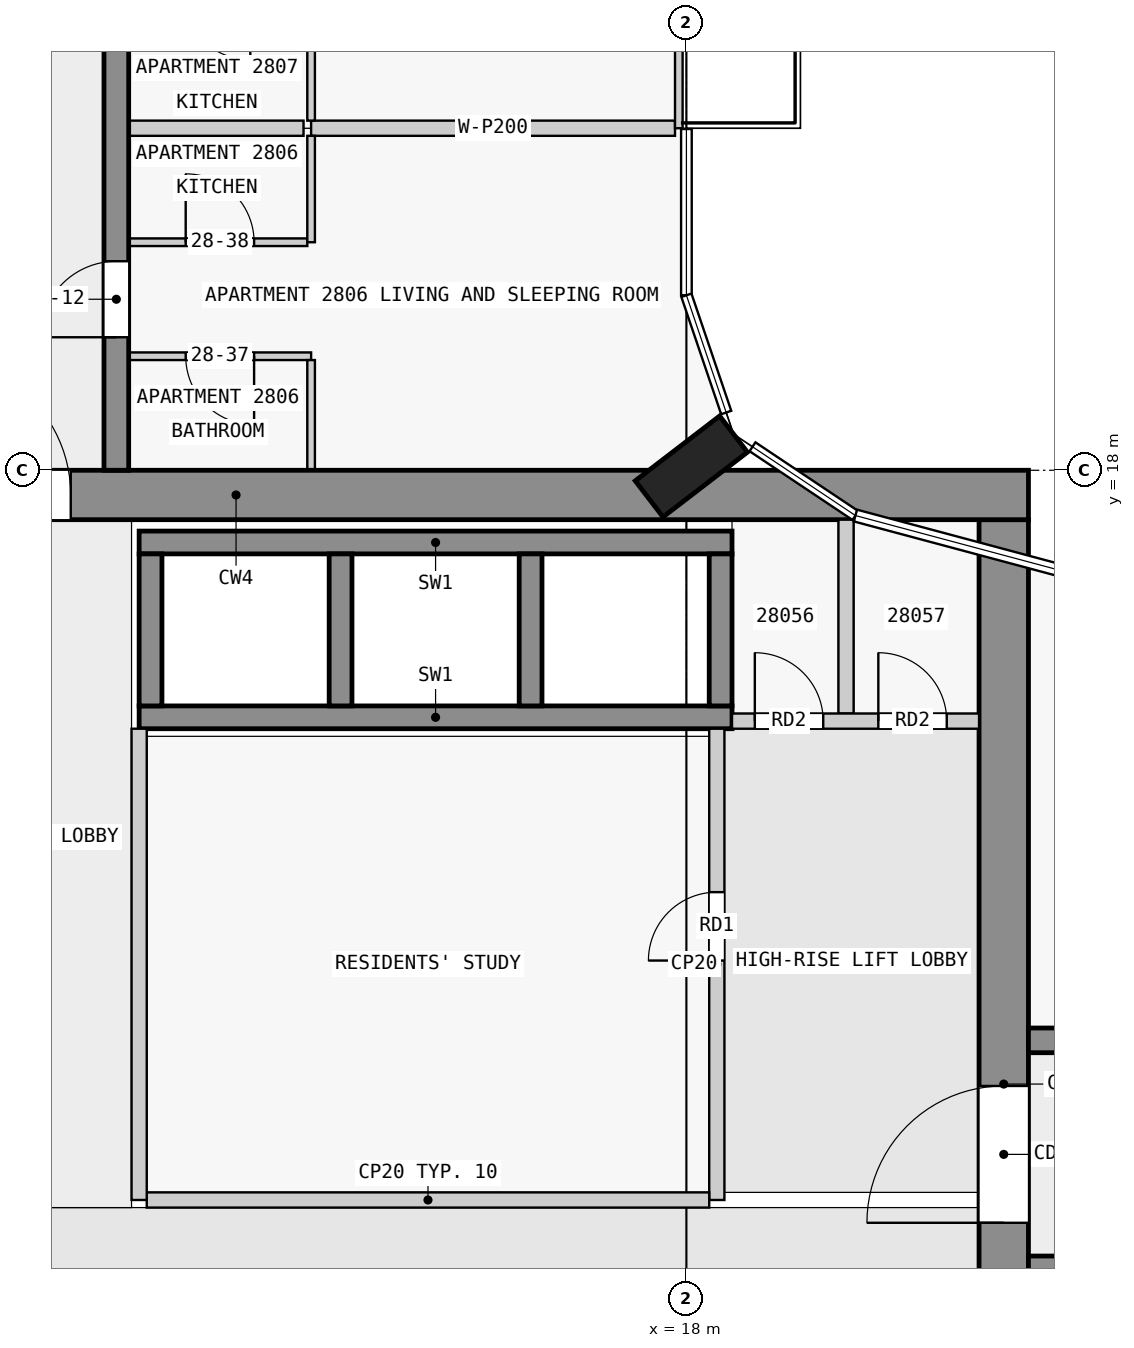
"""IFC4 building model, lengths in metres.
Left out: names, types, materials, properties, quantities, classifications, styles, units other than length and angle.
Written with IfcOpenShell. Run it as: python <this file> out.ifc"""

import sys

from ifc_helpers import new_model, si_unit, direction, frame, frame_2d, origin, origin_2d, place, context, subcontext, project, spatial, rectangle, extrude, element, fill, save


model = new_model("IFC4")
c1 = context("Model", 3, precision=1e-05, world=origin(), true_north=direction((0.0, 1.0)))
c2 = subcontext(c1, "Body", "Model", "MODEL_VIEW")
j1 = project(units=[si_unit("LENGTHUNIT", "METRE"), si_unit("PLANEANGLEUNIT", "RADIAN")], contexts=[c1])
p1 = place(None, origin())
s1 = spatial("IfcSite", under=j1, at=p1, CompositionType="ELEMENT")
p2 = place(p1, origin())
s2 = spatial("IfcBuilding", under=s1, at=p2, CompositionType="ELEMENT")
p3 = place(p2, frame((0.0, 0.0, 109.8)))
s3 = spatial("IfcBuildingStorey", under=s2, at=p3, CompositionType="ELEMENT", Elevation=109.8)
p4 = place(p3, frame((18.065, 18.05, 0.0), z_axis=(0.0, 0.0, 1.0), x_axis=(-0.608810846443, 0.793315418515, 0.0)))
e1 = element("IfcColumn", 1, at=p4, inside=s3, PredefinedType="COLUMN", context=c2, shape_type="SweptSolid", body=[
    extrude(rectangle(XDim=0.6, YDim=1.4, at=origin_2d()), origin(), (0.0, 0.0, 1.0), 3.5),
])
p5 = place(p3, frame((1.65, 17.675, 0.0), z_axis=(0.0, 0.0, 1.0), x_axis=(1.0, 0.0, 0.0)))
e2 = element("IfcWall", 2, at=p5, inside=s3, PredefinedType="SHEAR", context=c2, shape_type="SweptSolid", body=[
    extrude(rectangle(XDim=20.85, YDim=0.65, at=frame_2d((10.425, 0.0))), origin(), (0.0, 0.0, 1.0), 3.25),
])
p6 = place(p5, frame((6.45, 0.0, 0.0)))
e3 = element("IfcOpeningElement", 3, at=p6, cuts=e2, PredefinedType="OPENING", context=c2, shape_type="SweptSolid", body=[
    extrude(rectangle(XDim=1.8, YDim=2.1, at=frame_2d((0.9, 1.05))), frame((0.0, 0.335, 0.0), z_axis=(0.0, -1.0, 0.0), x_axis=(1.0, 0.0, 0.0)), (0.0, 0.0, 1.0), 0.67),
])
p7 = place(p3, frame((22.175, 2.5, 0.0), z_axis=(0.0, 0.0, 1.0), x_axis=(0.0, 1.0, 0.0)))
e4 = element("IfcWall", 4, at=p7, inside=s3, PredefinedType="SHEAR", context=c2, shape_type="SweptSolid", body=[
    extrude(rectangle(XDim=14.85, YDim=0.65, at=frame_2d((7.425, 0.0))), origin(), (0.0, 0.0, 1.0), 3.25),
])
p8 = place(p7, frame((5.6, 0.0, 0.0)))
e5 = element("IfcOpeningElement", 5, at=p8, cuts=e4, PredefinedType="OPENING", context=c2, shape_type="SweptSolid", body=[
    extrude(rectangle(XDim=1.8, YDim=2.1, at=frame_2d((0.9, 1.05))), frame((0.0, 0.335, 0.0), z_axis=(0.0, -1.0, 0.0), x_axis=(1.0, 0.0, 0.0)), (0.0, 0.0, 1.0), 0.67),
])
for number, where, z_axis, x_axis in (
    (6, (10.8, 17.05, 0.0), (0.0, 0.0, 1.0), (1.0, 0.0, 0.0)),
    (7, (10.8, 14.75, 0.0), (0.0, 0.0, 1.0), (1.0, 0.0, 0.0)),
):
    element("IfcWall", number, at=place(p3, frame(where, z_axis=z_axis, x_axis=x_axis)), inside=s3, PredefinedType="SHEAR", context=c2, shape_type="SweptSolid", body=[
        extrude(rectangle(XDim=7.8, YDim=0.3, at=frame_2d((3.9, 0.0))), origin(), (0.0, 0.0, 1.0), 3.25),
    ])
for number, where, z_axis, x_axis in (
    (8, (10.95, 14.9, 0.0), (0.0, 0.0, 1.0), (0.0, 1.0, 0.0)),
    (9, (13.45, 14.9, 0.0), (0.0, 0.0, 1.0), (0.0, 1.0, 0.0)),
    (10, (15.95, 14.9, 0.0), (0.0, 0.0, 1.0), (0.0, 1.0, 0.0)),
    (11, (18.45, 14.9, 0.0), (0.0, 0.0, 1.0), (0.0, 1.0, 0.0)),
):
    element("IfcWall", number, at=place(p3, frame(where, z_axis=z_axis, x_axis=x_axis)), inside=s3, PredefinedType="SHEAR", context=c2, shape_type="SweptSolid", body=[
        extrude(rectangle(XDim=2.0, YDim=0.3, at=frame_2d((1.0, 0.0))), origin(), (0.0, 0.0, 1.0), 3.25),
    ])
p9 = place(p3, frame((22.5, 7.5, 0.0), z_axis=(0.0, 0.0, 1.0), x_axis=(1.0, 0.0, 0.0)))
e12 = element("IfcWall", 12, at=p9, inside=s3, PredefinedType="SHEAR", context=c2, shape_type="SweptSolid", body=[
    extrude(rectangle(XDim=22.5, YDim=0.325, at=frame_2d((11.25, 0.0))), origin(), (0.0, 0.0, 1.0), 3.25),
])
p10 = place(p9, frame((4.05, 0.0, 0.0)))
e13 = element("IfcOpeningElement", 13, at=p10, cuts=e12, PredefinedType="OPENING", context=c2, shape_type="SweptSolid", body=[
    extrude(rectangle(XDim=1.0, YDim=2.1, at=frame_2d((0.5, 1.05))), frame((0.0, 0.172, 0.0), z_axis=(0.0, -1.0, 0.0), x_axis=(1.0, 0.0, 0.0)), (0.0, 0.0, 1.0), 0.345),
])
p11 = place(p9, frame((10.75, 0.0, 0.0)))
e14 = element("IfcOpeningElement", 14, at=p11, cuts=e12, PredefinedType="OPENING", context=c2, shape_type="SweptSolid", body=[
    extrude(rectangle(XDim=1.0, YDim=2.1, at=frame_2d((0.5, 1.05))), frame((0.0, 0.172, 0.0), z_axis=(0.0, -1.0, 0.0), x_axis=(1.0, 0.0, 0.0)), (0.0, 0.0, 1.0), 0.345),
])
p12 = place(p9, frame((16.85, 0.0, 0.0)))
e15 = element("IfcOpeningElement", 15, at=p12, cuts=e12, PredefinedType="OPENING", context=c2, shape_type="SweptSolid", body=[
    extrude(rectangle(XDim=1.0, YDim=2.1, at=frame_2d((0.5, 1.05))), frame((0.0, 0.172, 0.0), z_axis=(0.0, -1.0, 0.0), x_axis=(1.0, 0.0, 0.0)), (0.0, 0.0, 1.0), 0.345),
])
p13 = place(p3, frame((22.5, 10.5, 0.0), z_axis=(0.0, 0.0, 1.0), x_axis=(1.0, 0.0, 0.0)))
e16 = element("IfcWall", 16, at=p13, inside=s3, PredefinedType="SHEAR", context=c2, shape_type="SweptSolid", body=[
    extrude(rectangle(XDim=22.5, YDim=0.325, at=frame_2d((11.25, 0.0))), origin(), (0.0, 0.0, 1.0), 3.25),
])
p14 = place(p13, frame((1.85, 0.0, 0.0)))
e17 = element("IfcOpeningElement", 17, at=p14, cuts=e16, PredefinedType="OPENING", context=c2, shape_type="SweptSolid", body=[
    extrude(rectangle(XDim=0.9, YDim=2.1, at=frame_2d((0.45, 1.05))), frame((0.0, 0.172, 0.0), z_axis=(0.0, -1.0, 0.0), x_axis=(1.0, 0.0, 0.0)), (0.0, 0.0, 1.0), 0.345),
])
p15 = place(p13, frame((6.25, 0.0, 0.0)))
e18 = element("IfcOpeningElement", 18, at=p15, cuts=e16, PredefinedType="OPENING", context=c2, shape_type="SweptSolid", body=[
    extrude(rectangle(XDim=1.0, YDim=2.1, at=frame_2d((0.5, 1.05))), frame((0.0, 0.172, 0.0), z_axis=(0.0, -1.0, 0.0), x_axis=(1.0, 0.0, 0.0)), (0.0, 0.0, 1.0), 0.345),
])
p16 = place(p13, frame((13.05, 0.0, 0.0)))
e19 = element("IfcOpeningElement", 19, at=p16, cuts=e16, PredefinedType="OPENING", context=c2, shape_type="SweptSolid", body=[
    extrude(rectangle(XDim=1.0, YDim=2.1, at=frame_2d((0.5, 1.05))), frame((0.0, 0.172, 0.0), z_axis=(0.0, -1.0, 0.0), x_axis=(1.0, 0.0, 0.0)), (0.0, 0.0, 1.0), 0.345),
])
p17 = place(p13, frame((18.75, 0.0, 0.0)))
e20 = element("IfcOpeningElement", 20, at=p17, cuts=e16, PredefinedType="OPENING", context=c2, shape_type="SweptSolid", body=[
    extrude(rectangle(XDim=0.9, YDim=2.1, at=frame_2d((0.45, 1.05))), frame((0.0, 0.172, 0.0), z_axis=(0.0, -1.0, 0.0), x_axis=(1.0, 0.0, 0.0)), (0.0, 0.0, 1.0), 0.345),
])
p18 = place(p13, frame((20.95, 0.0, 0.0)))
e21 = element("IfcOpeningElement", 21, at=p18, cuts=e16, PredefinedType="OPENING", context=c2, shape_type="SweptSolid", body=[
    extrude(rectangle(XDim=1.0, YDim=2.1, at=frame_2d((0.5, 1.05))), frame((0.0, 0.172, 0.0), z_axis=(0.0, -1.0, 0.0), x_axis=(1.0, 0.0, 0.0)), (0.0, 0.0, 1.0), 0.345),
])
p19 = place(p3, frame((10.5, 18.0, 0.0), z_axis=(0.0, 0.0, 1.0), x_axis=(0.0, 1.0, 0.0)))
e22 = element("IfcWall", 22, at=p19, inside=s3, PredefinedType="SHEAR", context=c2, shape_type="SweptSolid", body=[
    extrude(rectangle(XDim=27.0, YDim=0.325, at=frame_2d((13.5, 0.0))), origin(), (0.0, 0.0, 1.0), 3.25),
])
p20 = place(p19, frame((1.75, 0.0, 0.0)))
e23 = element("IfcOpeningElement", 23, at=p20, cuts=e22, PredefinedType="OPENING", context=c2, shape_type="SweptSolid", body=[
    extrude(rectangle(XDim=1.0, YDim=2.1, at=frame_2d((0.5, 1.05))), frame((0.0, 0.172, 0.0), z_axis=(0.0, -1.0, 0.0), x_axis=(1.0, 0.0, 0.0)), (0.0, 0.0, 1.0), 0.345),
])
p21 = place(p19, frame((8.55, 0.0, 0.0)))
e24 = element("IfcOpeningElement", 24, at=p21, cuts=e22, PredefinedType="OPENING", context=c2, shape_type="SweptSolid", body=[
    extrude(rectangle(XDim=1.0, YDim=2.1, at=frame_2d((0.5, 1.05))), frame((0.0, 0.172, 0.0), z_axis=(0.0, -1.0, 0.0), x_axis=(1.0, 0.0, 0.0)), (0.0, 0.0, 1.0), 0.345),
])
p22 = place(p19, frame((15.35, 0.0, 0.0)))
e25 = element("IfcOpeningElement", 25, at=p22, cuts=e22, PredefinedType="OPENING", context=c2, shape_type="SweptSolid", body=[
    extrude(rectangle(XDim=0.9, YDim=2.1, at=frame_2d((0.45, 1.05))), frame((0.0, 0.172, 0.0), z_axis=(0.0, -1.0, 0.0), x_axis=(1.0, 0.0, 0.0)), (0.0, 0.0, 1.0), 0.345),
])
p23 = place(p19, frame((19.75, 0.0, 0.0)))
e26 = element("IfcOpeningElement", 26, at=p23, cuts=e22, PredefinedType="OPENING", context=c2, shape_type="SweptSolid", body=[
    extrude(rectangle(XDim=1.0, YDim=2.1, at=frame_2d((0.5, 1.05))), frame((0.0, 0.172, 0.0), z_axis=(0.0, -1.0, 0.0), x_axis=(1.0, 0.0, 0.0)), (0.0, 0.0, 1.0), 0.345),
])
p24 = place(p19, frame((23.25, 0.0, 0.0)))
e27 = element("IfcOpeningElement", 27, at=p24, cuts=e22, PredefinedType="OPENING", context=c2, shape_type="SweptSolid", body=[
    extrude(rectangle(XDim=0.9, YDim=2.1, at=frame_2d((0.45, 1.05))), frame((0.0, 0.172, 0.0), z_axis=(0.0, -1.0, 0.0), x_axis=(1.0, 0.0, 0.0)), (0.0, 0.0, 1.0), 0.345),
])
p25 = place(p19, frame((25.45, 0.0, 0.0)))
e28 = element("IfcOpeningElement", 28, at=p25, cuts=e22, PredefinedType="OPENING", context=c2, shape_type="SweptSolid", body=[
    extrude(rectangle(XDim=1.0, YDim=2.1, at=frame_2d((0.5, 1.05))), frame((0.0, 0.172, 0.0), z_axis=(0.0, -1.0, 0.0), x_axis=(1.0, 0.0, 0.0)), (0.0, 0.0, 1.0), 0.345),
])
p26 = place(p3, frame((17.9, 27.0, 0.0), z_axis=(0.0, 0.0, 1.0), x_axis=(0.0, -1.0, 0.0)))
e29 = element("IfcWall", 29, at=p26, inside=s3, PredefinedType="STANDARD", context=c2, shape_type="SweptSolid", body=[
    extrude(rectangle(XDim=4.5, YDim=0.1, at=frame_2d((2.25, 0.0))), origin(), (0.0, 0.0, 1.0), 3.25),
])
p27 = place(p26, frame((1.05, 0.0, 0.0)))
e30 = element("IfcOpeningElement", 30, at=p27, cuts=e29, PredefinedType="OPENING", context=c2, shape_type="SweptSolid", body=[
    extrude(rectangle(XDim=2.4, YDim=2.4, at=frame_2d((1.2, 1.2))), frame((0.0, 0.06, 0.0), z_axis=(0.0, -1.0, 0.0), x_axis=(1.0, 0.0, 0.0)), (0.0, 0.0, 1.0), 0.12),
])
p28 = place(p3, frame((10.8, 8.4, 0.0), z_axis=(0.0, 0.0, 1.0), x_axis=(0.0, 1.0, 0.0)))
e31 = element("IfcWall", 31, at=p28, inside=s3, PredefinedType="PARTITIONING", context=c2, shape_type="SweptSolid", body=[
    extrude(rectangle(XDim=6.2, YDim=0.2, at=frame_2d((3.1, 0.0))), origin(), (0.0, 0.0, 1.0), 3.25),
])
p29 = place(p3, frame((10.9, 8.4, 0.0), z_axis=(0.0, 0.0, 1.0), x_axis=(1.0, 0.0, 0.0)))
e32 = element("IfcWall", 32, at=p29, inside=s3, PredefinedType="PARTITIONING", context=c2, shape_type="SweptSolid", body=[
    extrude(rectangle(XDim=7.4, YDim=0.2, at=frame_2d((3.7, 0.0))), origin(), (0.0, 0.0, 1.0), 3.25),
])
p30 = place(p3, frame((18.4, 8.4, 0.0), z_axis=(0.0, 0.0, 1.0), x_axis=(0.0, 1.0, 0.0)))
e33 = element("IfcWall", 33, at=p30, inside=s3, PredefinedType="PARTITIONING", context=c2, shape_type="SweptSolid", body=[
    extrude(rectangle(XDim=6.2, YDim=0.2, at=frame_2d((3.1, 0.0))), origin(), (0.0, 0.0, 1.0), 3.25),
])
p31 = place(p30, frame((3.15, 0.0, 0.0)))
e34 = element("IfcOpeningElement", 34, at=p31, cuts=e33, PredefinedType="OPENING", context=c2, shape_type="SweptSolid", body=[
    extrude(rectangle(XDim=0.9, YDim=2.1, at=frame_2d((0.45, 1.05))), frame((0.0, 0.11, 0.0), z_axis=(0.0, -1.0, 0.0), x_axis=(1.0, 0.0, 0.0)), (0.0, 0.0, 1.0), 0.22),
])
p32 = place(p3, frame((18.6, 14.7, 0.0), z_axis=(0.0, 0.0, 1.0), x_axis=(1.0, 0.0, 0.0)))
e35 = element("IfcWall", 35, at=p32, inside=s3, PredefinedType="PARTITIONING", context=c2, shape_type="SweptSolid", body=[
    extrude(rectangle(XDim=3.25, YDim=0.2, at=frame_2d((1.625, 0.0))), origin(), (0.0, 0.0, 1.0), 3.25),
])
p33 = place(p32, frame((0.3, 0.0, 0.0)))
e36 = element("IfcOpeningElement", 36, at=p33, cuts=e35, PredefinedType="OPENING", context=c2, shape_type="SweptSolid", body=[
    extrude(rectangle(XDim=0.9, YDim=2.1, at=frame_2d((0.45, 1.05))), frame((0.0, 0.11, 0.0), z_axis=(0.0, -1.0, 0.0), x_axis=(1.0, 0.0, 0.0)), (0.0, 0.0, 1.0), 0.22),
])
p34 = place(p32, frame((1.925, 0.0, 0.0)))
e37 = element("IfcOpeningElement", 37, at=p34, cuts=e35, PredefinedType="OPENING", context=c2, shape_type="SweptSolid", body=[
    extrude(rectangle(XDim=0.9, YDim=2.1, at=frame_2d((0.45, 1.05))), frame((0.0, 0.11, 0.0), z_axis=(0.0, -1.0, 0.0), x_axis=(1.0, 0.0, 0.0)), (0.0, 0.0, 1.0), 0.22),
])
p35 = place(p3, frame((20.1, 14.8, 0.0), z_axis=(0.0, 0.0, 1.0), x_axis=(0.0, 1.0, 0.0)))
e38 = element("IfcWall", 38, at=p35, inside=s3, PredefinedType="PARTITIONING", context=c2, shape_type="SweptSolid", body=[
    extrude(rectangle(XDim=2.55, YDim=0.2, at=frame_2d((1.275, 0.0))), origin(), (0.0, 0.0, 1.0), 3.25),
])
p36 = place(p3, frame((13.062, 19.5, 0.0), z_axis=(0.0, 0.0, 1.0), x_axis=(-1.0, 0.0, 0.0)))
e39 = element("IfcWall", 39, at=p36, inside=s3, PredefinedType="PARTITIONING", context=c2, shape_type="SweptSolid", body=[
    extrude(rectangle(XDim=2.4, YDim=0.1, at=frame_2d((1.2, 0.0))), origin(), (0.0, 0.0, 1.0), 3.25),
])
p37 = place(p36, frame((0.75, 0.0, 0.0)))
e40 = element("IfcOpeningElement", 40, at=p37, cuts=e39, PredefinedType="OPENING", context=c2, shape_type="SweptSolid", body=[
    extrude(rectangle(XDim=0.9, YDim=2.1, at=frame_2d((0.45, 1.05))), frame((0.0, 0.06, 0.0), z_axis=(0.0, -1.0, 0.0), x_axis=(1.0, 0.0, 0.0)), (0.0, 0.0, 1.0), 0.12),
])
p38 = place(p3, frame((10.663, 21.0, 0.0), z_axis=(0.0, 0.0, 1.0), x_axis=(1.0, 0.0, 0.0)))
e41 = element("IfcWall", 41, at=p38, inside=s3, PredefinedType="PARTITIONING", context=c2, shape_type="SweptSolid", body=[
    extrude(rectangle(XDim=2.35, YDim=0.1, at=frame_2d((1.175, 0.0))), origin(), (0.0, 0.0, 1.0), 3.25),
])
p39 = place(p38, frame((0.75, 0.0, 0.0)))
e42 = element("IfcOpeningElement", 42, at=p39, cuts=e41, PredefinedType="OPENING", context=c2, shape_type="SweptSolid", body=[
    extrude(rectangle(XDim=0.9, YDim=2.1, at=frame_2d((0.45, 1.05))), frame((0.0, 0.06, 0.0), z_axis=(0.0, -1.0, 0.0), x_axis=(1.0, 0.0, 0.0)), (0.0, 0.0, 1.0), 0.12),
])
p40 = place(p3, frame((12.962, 22.5, 0.0), z_axis=(0.0, 0.0, 1.0), x_axis=(-1.0, 0.0, 0.0)))
e43 = element("IfcWall", 43, at=p40, inside=s3, PredefinedType="PARTITIONING", context=c2, shape_type="SweptSolid", body=[
    extrude(rectangle(XDim=2.3, YDim=0.2, at=frame_2d((1.15, 0.0))), origin(), (0.0, 0.0, 1.0), 3.25),
])
p41 = place(p3, frame((13.062, 22.5, 0.0), z_axis=(0.0, 0.0, 1.0), x_axis=(1.0, 0.0, 0.0)))
e44 = element("IfcWall", 44, at=p41, inside=s3, PredefinedType="PARTITIONING", context=c2, shape_type="SweptSolid", body=[
    extrude(rectangle(XDim=4.788, YDim=0.2, at=frame_2d((2.394, 0.0))), origin(), (0.0, 0.0, 1.0), 3.25),
])
p42 = place(p3, frame((13.062, 18.0, 0.0), z_axis=(0.0, 0.0, 1.0), x_axis=(0.0, 1.0, 0.0)))
e45 = element("IfcWall", 45, at=p42, inside=s3, PredefinedType="PARTITIONING", context=c2, shape_type="SweptSolid", body=[
    extrude(rectangle(XDim=1.45, YDim=0.1, at=frame_2d((0.725, 0.0))), origin(), (0.0, 0.0, 1.0), 3.25),
])
p43 = place(p3, frame((13.062, 21.0, 0.0), z_axis=(0.0, 0.0, 1.0), x_axis=(0.0, 1.0, 0.0)))
e46 = element("IfcWall", 46, at=p43, inside=s3, PredefinedType="PARTITIONING", context=c2, shape_type="SweptSolid", body=[
    extrude(rectangle(XDim=1.4, YDim=0.1, at=frame_2d((0.7, 0.0))), origin(), (0.0, 0.0, 1.0), 3.25),
])
p44 = place(p3, frame((13.062, 22.6, 0.0), z_axis=(0.0, 0.0, 1.0), x_axis=(0.0, 1.0, 0.0)))
e47 = element("IfcWall", 47, at=p44, inside=s3, PredefinedType="PARTITIONING", context=c2, shape_type="SweptSolid", body=[
    extrude(rectangle(XDim=1.7, YDim=0.1, at=frame_2d((0.85, 0.0))), origin(), (0.0, 0.0, 1.0), 3.25),
])
p45 = place(p31, origin())
e48 = element("IfcDoor", 48, at=p45, inside=s3, OperationType="SINGLE_SWING_LEFT", PredefinedType="DOOR", context=c2, shape_type="SweptSolid", body=[
    extrude(rectangle(XDim=0.9, YDim=2.1, at=frame_2d((0.45, 1.05))), frame((0.0, 0.025, 0.0), z_axis=(0.0, -1.0, 0.0), x_axis=(1.0, 0.0, 0.0)), (0.0, 0.0, 1.0), 0.05),
])
fill(e34, e48)
p46 = place(p8, origin())
e49 = element("IfcDoor", 49, at=p46, inside=s3, OperationType="DOUBLE_DOOR_SINGLE_SWING", PredefinedType="DOOR", context=c2, shape_type="SweptSolid", body=[
    extrude(rectangle(XDim=1.8, YDim=2.1, at=frame_2d((0.9, 1.05))), frame((0.0, 0.025, 0.0), z_axis=(0.0, -1.0, 0.0), x_axis=(1.0, 0.0, 0.0)), (0.0, 0.0, 1.0), 0.05),
])
fill(e5, e49)
p47 = place(p6, origin())
e50 = element("IfcDoor", 50, at=p47, inside=s3, OperationType="DOUBLE_DOOR_SINGLE_SWING", PredefinedType="DOOR", context=c2, shape_type="SweptSolid", body=[
    extrude(rectangle(XDim=1.8, YDim=2.1, at=frame_2d((0.9, 1.05))), frame((0.0, 0.025, 0.0), z_axis=(0.0, -1.0, 0.0), x_axis=(1.0, 0.0, 0.0)), (0.0, 0.0, 1.0), 0.05),
])
fill(e3, e50)
p48 = place(p33, origin())
e51 = element("IfcDoor", 51, at=p48, inside=s3, OperationType="SINGLE_SWING_LEFT", PredefinedType="DOOR", context=c2, shape_type="SweptSolid", body=[
    extrude(rectangle(XDim=0.9, YDim=2.1, at=frame_2d((0.45, 1.05))), frame((0.0, 0.025, 0.0), z_axis=(0.0, -1.0, 0.0), x_axis=(1.0, 0.0, 0.0)), (0.0, 0.0, 1.0), 0.05),
])
fill(e36, e51)
p49 = place(p34, origin())
e52 = element("IfcDoor", 52, at=p49, inside=s3, OperationType="SINGLE_SWING_LEFT", PredefinedType="DOOR", context=c2, shape_type="SweptSolid", body=[
    extrude(rectangle(XDim=0.9, YDim=2.1, at=frame_2d((0.45, 1.05))), frame((0.0, 0.025, 0.0), z_axis=(0.0, -1.0, 0.0), x_axis=(1.0, 0.0, 0.0)), (0.0, 0.0, 1.0), 0.05),
])
fill(e37, e52)
p50 = place(p20, origin())
e53 = element("IfcDoor", 53, at=p50, inside=s3, OperationType="SINGLE_SWING_LEFT", PredefinedType="DOOR", context=c2, shape_type="SweptSolid", body=[
    extrude(rectangle(XDim=1.0, YDim=2.1, at=frame_2d((0.5, 1.05))), frame((0.0, 0.025, 0.0), z_axis=(0.0, -1.0, 0.0), x_axis=(1.0, 0.0, 0.0)), (0.0, 0.0, 1.0), 0.05),
])
fill(e23, e53)
p51 = place(p37, origin())
e54 = element("IfcDoor", 54, at=p51, inside=s3, OperationType="SINGLE_SWING_LEFT", PredefinedType="DOOR", context=c2, shape_type="SweptSolid", body=[
    extrude(rectangle(XDim=0.9, YDim=2.1, at=frame_2d((0.45, 1.05))), frame((0.0, 0.025, 0.0), z_axis=(0.0, -1.0, 0.0), x_axis=(1.0, 0.0, 0.0)), (0.0, 0.0, 1.0), 0.05),
])
fill(e40, e54)
p52 = place(p39, origin())
e55 = element("IfcDoor", 55, at=p52, inside=s3, OperationType="SINGLE_SWING_RIGHT", PredefinedType="DOOR", context=c2, shape_type="SweptSolid", body=[
    extrude(rectangle(XDim=0.9, YDim=2.1, at=frame_2d((0.45, 1.05))), frame((0.0, 0.025, 0.0), z_axis=(0.0, -1.0, 0.0), x_axis=(1.0, 0.0, 0.0)), (0.0, 0.0, 1.0), 0.05),
])
fill(e42, e55)
save(model, sys.argv[1])
